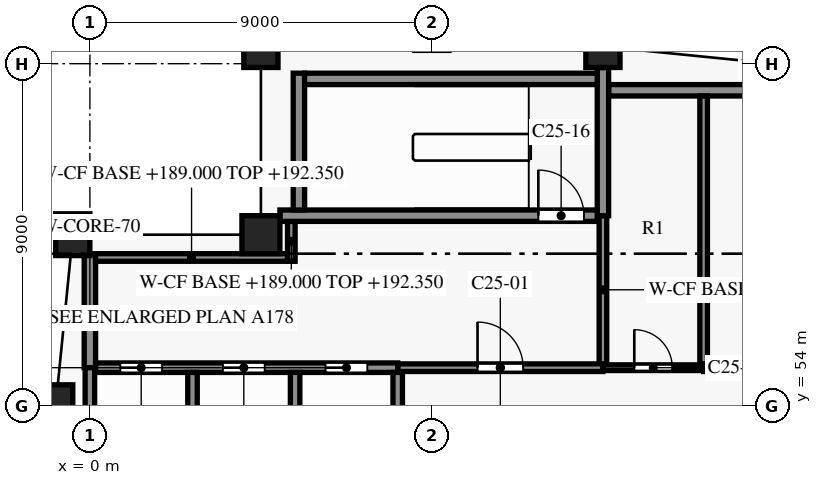
"""IFC4 building model, lengths in metres.
Left out: names, types, materials, properties, quantities, classifications, styles, units other than length and angle.
Written with IfcOpenShell. Run it as: python <this file> out.ifc"""

import sys

from ifc_helpers import new_model, si_unit, direction, frame, frame_2d, origin, origin_2d, place, context, subcontext, project, spatial, rectangle, extrude, element, fill, save


model = new_model("IFC4")
c1 = context("Model", 3, precision=1e-05, world=origin(), true_north=direction((0.0, 1.0)))
c2 = subcontext(c1, "Body", "Model", "MODEL_VIEW")
j1 = project(units=[si_unit("LENGTHUNIT", "METRE"), si_unit("PLANEANGLEUNIT", "RADIAN")], contexts=[c1])
p1 = place(None, origin())
s1 = spatial("IfcSite", under=j1, at=p1, CompositionType="ELEMENT")
p2 = place(p1, origin())
s2 = spatial("IfcBuilding", under=s1, at=p2, CompositionType="ELEMENT")
p3 = place(p2, frame((0.0, 0.0, 189.0)))
s3 = spatial("IfcBuildingStorey", under=s2, at=p3, CompositionType="ELEMENT", Elevation=189.0)
for number, where, z_axis, x_axis in (
    (1, (13.5, 63.45, 0.0), (0.0, 0.0, 1.0), (-0.995, 0.1, 0.0)),
    (2, (4.5, 63.45, 0.0), (0.0, 0.0, 1.0), (-0.995, -0.1, 0.0)),
    (3, (-0.45, 58.5, 0.0), (0.0, 0.0, 1.0), (-0.1, -0.995, 0.0)),
    (4, (-0.9, 54.0, 0.0), (0.0, 0.0, 1.0), (0.0, -1.0, 0.0)),
):
    element("IfcColumn", number, at=place(p3, frame(where, z_axis=z_axis, x_axis=x_axis)), inside=s3, PredefinedType="COLUMN", context=c2, shape_type="SweptSolid", body=[
        extrude(rectangle(XDim=0.9, YDim=1.1, at=origin_2d()), origin(), (0.0, 0.0, 1.0), 3.8),
    ])
p4 = place(p3, frame((4.5, 58.5, 0.0), z_axis=(0.0, 0.0, 1.0), x_axis=(1.0, 0.0, 0.0)))
e5 = element("IfcColumn", 5, at=p4, inside=s3, PredefinedType="COLUMN", context=c2, shape_type="SweptSolid", body=[
    extrude(rectangle(XDim=1.0, YDim=1.0, at=origin_2d()), origin(), (0.0, 0.0, 1.0), 3.8),
])
p5 = place(p3, frame((8.1, 55.0, 0.0), z_axis=(0.0, 0.0, 1.0), x_axis=(1.0, 0.0, 0.0)))
e6 = element("IfcWall", 6, at=p5, inside=s3, PredefinedType="PARTITIONING", context=c2, shape_type="SweptSolid", body=[
    extrude(rectangle(XDim=5.4, YDim=0.2, at=frame_2d((2.7, 0.0))), origin(), (0.0, 0.0, 1.0), 3.35),
])
p6 = place(p5, frame((2.1, 0.0, 0.0)))
e7 = element("IfcOpeningElement", 7, at=p6, cuts=e6, PredefinedType="OPENING", context=c2, shape_type="SweptSolid", body=[
    extrude(rectangle(XDim=1.2, YDim=2.2, at=frame_2d((0.6, 1.1))), frame((0.0, 0.11, 0.0), z_axis=(0.0, -1.0, 0.0), x_axis=(1.0, 0.0, 0.0)), (0.0, 0.0, 1.0), 0.22),
])
p7 = place(p3, frame((13.5, 55.0, 0.0), z_axis=(0.0, 0.0, 1.0), x_axis=(1.0, 0.0, 0.0)))
e8 = element("IfcWall", 8, at=p7, inside=s3, PredefinedType="PARTITIONING", context=c2, shape_type="SweptSolid", body=[
    extrude(rectangle(XDim=2.65, YDim=0.15, at=frame_2d((1.325, 0.0))), origin(), (0.0, 0.0, 1.0), 3.35),
])
p8 = place(p7, frame((0.825, 0.0, 0.0)))
e9 = element("IfcOpeningElement", 9, at=p8, cuts=e8, PredefinedType="OPENING", context=c2, shape_type="SweptSolid", body=[
    extrude(rectangle(XDim=1.0, YDim=2.1, at=frame_2d((0.5, 1.05))), frame((0.0, 0.085, 0.0), z_axis=(0.0, -1.0, 0.0), x_axis=(1.0, 0.0, 0.0)), (0.0, 0.0, 1.0), 0.17),
])
p9 = place(p3, frame((16.15, 55.0, 0.0), z_axis=(0.0, 0.0, 1.0), x_axis=(1.0, 0.0, 0.0)))
e10 = element("IfcWall", 10, at=p9, inside=s3, PredefinedType="PARTITIONING", context=c2, shape_type="SweptSolid", body=[
    extrude(rectangle(XDim=7.25, YDim=0.2, at=frame_2d((3.625, 0.0))), origin(), (0.0, 0.0, 1.0), 3.35),
])
p10 = place(p9, frame((3.125, 0.0, 0.0)))
e11 = element("IfcOpeningElement", 11, at=p10, cuts=e10, PredefinedType="OPENING", context=c2, shape_type="SweptSolid", body=[
    extrude(rectangle(XDim=1.0, YDim=2.1, at=frame_2d((0.5, 1.05))), frame((0.0, 0.11, 0.0), z_axis=(0.0, -1.0, 0.0), x_axis=(1.0, 0.0, 0.0)), (0.0, 0.0, 1.0), 0.22),
])
p11 = place(p3, frame((0.15, 55.0, 0.0), z_axis=(0.0, 0.0, 1.0), x_axis=(1.0, 0.0, 0.0)))
e12 = element("IfcWall", 12, at=p11, inside=s3, PredefinedType="SHEAR", context=c2, shape_type="SweptSolid", body=[
    extrude(rectangle(XDim=7.95, YDim=0.25, at=frame_2d((3.975, 0.0))), origin(), (0.0, 0.0, 1.0), 3.5),
])
p12 = place(p11, frame((0.65, 0.0, 0.0)))
e13 = element("IfcOpeningElement", 13, at=p12, cuts=e12, PredefinedType="OPENING", context=c2, shape_type="SweptSolid", body=[
    extrude(rectangle(XDim=1.1, YDim=2.1, at=frame_2d((0.55, 1.05))), frame((0.0, 0.135, 0.0), z_axis=(0.0, -1.0, 0.0), x_axis=(1.0, 0.0, 0.0)), (0.0, 0.0, 1.0), 0.27),
])
p13 = place(p11, frame((3.35, 0.0, 0.0)))
e14 = element("IfcOpeningElement", 14, at=p13, cuts=e12, PredefinedType="OPENING", context=c2, shape_type="SweptSolid", body=[
    extrude(rectangle(XDim=1.1, YDim=2.1, at=frame_2d((0.55, 1.05))), frame((0.0, 0.135, 0.0), z_axis=(0.0, -1.0, 0.0), x_axis=(1.0, 0.0, 0.0)), (0.0, 0.0, 1.0), 0.27),
])
p14 = place(p11, frame((6.05, 0.0, 0.0)))
e15 = element("IfcOpeningElement", 15, at=p14, cuts=e12, PredefinedType="OPENING", context=c2, shape_type="SweptSolid", body=[
    extrude(rectangle(XDim=1.1, YDim=2.1, at=frame_2d((0.55, 1.05))), frame((0.0, 0.135, 0.0), z_axis=(0.0, -1.0, 0.0), x_axis=(1.0, 0.0, 0.0)), (0.0, 0.0, 1.0), 0.27),
])
p15 = place(p3, frame((0.15, 57.9, 0.0), z_axis=(0.0, 0.0, 1.0), x_axis=(1.0, 0.0, 0.0)))
e16 = element("IfcWall", 16, at=p15, inside=s3, PredefinedType="PARTITIONING", context=c2, shape_type="SweptSolid", body=[
    extrude(rectangle(XDim=5.05, YDim=0.2, at=frame_2d((2.525, 0.0))), origin(), (0.0, 0.0, 1.0), 3.35),
])
p16 = place(p3, frame((5.0, 59.0, 0.0), z_axis=(0.0, 0.0, 1.0), x_axis=(1.0, 0.0, 0.0)))
e17 = element("IfcWall", 17, at=p16, inside=s3, PredefinedType="SHEAR", context=c2, shape_type="SweptSolid", body=[
    extrude(rectangle(XDim=8.35, YDim=0.3, at=frame_2d((4.175, 0.0))), origin(), (0.0, 0.0, 1.0), 3.5),
])
p17 = place(p16, frame((6.8, 0.0, 0.0)))
e18 = element("IfcOpeningElement", 18, at=p17, cuts=e17, PredefinedType="OPENING", context=c2, shape_type="SweptSolid", body=[
    extrude(rectangle(XDim=1.2, YDim=2.2, at=frame_2d((0.6, 1.1))), frame((0.0, 0.16, 0.0), z_axis=(0.0, -1.0, 0.0), x_axis=(1.0, 0.0, 0.0)), (0.0, 0.0, 1.0), 0.32),
])
p18 = place(p3, frame((13.65, 62.3, 0.0), z_axis=(0.0, 0.0, 1.0), x_axis=(1.0, 0.0, 0.0)))
e19 = element("IfcWall", 19, at=p18, inside=s3, PredefinedType="SHEAR", context=c2, shape_type="SweptSolid", body=[
    extrude(rectangle(XDim=9.6, YDim=0.3, at=frame_2d((4.8, 0.0))), origin(), (0.0, 0.0, 1.0), 3.5),
])
p19 = place(p3, frame((5.65, 62.6, 0.0), z_axis=(0.0, 0.0, 1.0), x_axis=(1.0, 0.0, 0.0)))
e20 = element("IfcWall", 20, at=p19, inside=s3, PredefinedType="SHEAR", context=c2, shape_type="SweptSolid", body=[
    extrude(rectangle(XDim=7.7, YDim=0.3, at=frame_2d((3.85, 0.0))), origin(), (0.0, 0.0, 1.0), 3.5),
])
p20 = place(p3, frame((0.0, 55.0, 0.0), z_axis=(0.0, 0.0, 1.0), x_axis=(0.0, 1.0, 0.0)))
e21 = element("IfcWall", 21, at=p20, inside=s3, PredefinedType="SHEAR", context=c2, shape_type="SweptSolid", body=[
    extrude(rectangle(XDim=3.0, YDim=0.3, at=frame_2d((1.5, 0.0))), origin(), (0.0, 0.0, 1.0), 3.5),
])
p21 = place(p3, frame((0.0, 51.65, 0.0), z_axis=(0.0, 0.0, 1.0), x_axis=(0.0, 1.0, 0.0)))
e22 = element("IfcWall", 22, at=p21, inside=s3, PredefinedType="SHEAR", context=c2, shape_type="SweptSolid", body=[
    extrude(rectangle(XDim=3.35, YDim=0.25, at=frame_2d((1.675, 0.0))), origin(), (0.0, 0.0, 1.0), 3.5),
])
p22 = place(p3, frame((2.7, 51.925, 0.0), z_axis=(0.0, 0.0, 1.0), x_axis=(0.0, 1.0, 0.0)))
e23 = element("IfcWall", 23, at=p22, inside=s3, PredefinedType="SHEAR", context=c2, shape_type="SweptSolid", body=[
    extrude(rectangle(XDim=2.95, YDim=0.25, at=frame_2d((1.475, 0.0))), origin(), (0.0, 0.0, 1.0), 3.5),
])
p23 = place(p3, frame((5.3, 57.8, 0.0), z_axis=(0.0, 0.0, 1.0), x_axis=(0.0, 1.0, 0.0)))
e24 = element("IfcWall", 24, at=p23, inside=s3, PredefinedType="PARTITIONING", context=c2, shape_type="SweptSolid", body=[
    extrude(rectangle(XDim=1.05, YDim=0.2, at=frame_2d((0.525, 0.0))), origin(), (0.0, 0.0, 1.0), 3.35),
])
p24 = place(p3, frame((5.4, 51.925, 0.0), z_axis=(0.0, 0.0, 1.0), x_axis=(0.0, 1.0, 0.0)))
e25 = element("IfcWall", 25, at=p24, inside=s3, PredefinedType="SHEAR", context=c2, shape_type="SweptSolid", body=[
    extrude(rectangle(XDim=2.95, YDim=0.25, at=frame_2d((1.475, 0.0))), origin(), (0.0, 0.0, 1.0), 3.5),
])
p25 = place(p3, frame((5.5, 59.15, 0.0), z_axis=(0.0, 0.0, 1.0), x_axis=(0.0, 1.0, 0.0)))
e26 = element("IfcWall", 26, at=p25, inside=s3, PredefinedType="SHEAR", context=c2, shape_type="SweptSolid", body=[
    extrude(rectangle(XDim=3.6, YDim=0.3, at=frame_2d((1.8, 0.0))), origin(), (0.0, 0.0, 1.0), 3.5),
])
p26 = place(p3, frame((8.1, 51.925, 0.0), z_axis=(0.0, 0.0, 1.0), x_axis=(0.0, 1.0, 0.0)))
e27 = element("IfcWall", 27, at=p26, inside=s3, PredefinedType="SHEAR", context=c2, shape_type="SweptSolid", body=[
    extrude(rectangle(XDim=2.95, YDim=0.25, at=frame_2d((1.475, 0.0))), origin(), (0.0, 0.0, 1.0), 3.5),
])
p27 = place(p3, frame((13.5, 55.1, 0.0), z_axis=(0.0, 0.0, 1.0), x_axis=(0.0, 1.0, 0.0)))
e28 = element("IfcWall", 28, at=p27, inside=s3, PredefinedType="PARTITIONING", context=c2, shape_type="SweptSolid", body=[
    extrude(rectangle(XDim=3.9, YDim=0.2, at=frame_2d((1.95, 0.0))), origin(), (0.0, 0.0, 1.0), 3.35),
])
p28 = place(p3, frame((13.5, 59.0, 0.0), z_axis=(0.0, 0.0, 1.0), x_axis=(0.0, 1.0, 0.0)))
e29 = element("IfcWall", 29, at=p28, inside=s3, PredefinedType="SHEAR", context=c2, shape_type="SweptSolid", body=[
    extrude(rectangle(XDim=3.897, YDim=0.3, at=frame_2d((1.949, 0.0))), origin(), (0.0, 0.0, 1.0), 3.5),
])
p29 = place(p3, frame((16.15, 55.1, 0.0), z_axis=(0.0, 0.0, 1.0), x_axis=(0.0, 1.0, 0.0)))
e30 = element("IfcWall", 30, at=p29, inside=s3, PredefinedType="PARTITIONING", context=c2, shape_type="SweptSolid", body=[
    extrude(rectangle(XDim=7.05, YDim=0.2, at=frame_2d((3.525, 0.0))), origin(), (0.0, 0.0, 1.0), 3.35),
])
p30 = place(p6, origin())
e31 = element("IfcDoor", 31, at=p30, inside=s3, OperationType="SINGLE_SWING_RIGHT", PredefinedType="DOOR", context=c2, shape_type="SweptSolid", body=[
    extrude(rectangle(XDim=1.2, YDim=2.2, at=frame_2d((0.6, 1.1))), frame((0.0, 0.025, 0.0), z_axis=(0.0, -1.0, 0.0), x_axis=(1.0, 0.0, 0.0)), (0.0, 0.0, 1.0), 0.05),
])
fill(e7, e31)
p31 = place(p8, origin())
e32 = element("IfcDoor", 32, at=p31, inside=s3, OperationType="SINGLE_SWING_LEFT", PredefinedType="DOOR", context=c2, shape_type="SweptSolid", body=[
    extrude(rectangle(XDim=1.0, YDim=2.1, at=frame_2d((0.5, 1.05))), frame((0.0, 0.025, 0.0), z_axis=(0.0, -1.0, 0.0), x_axis=(1.0, 0.0, 0.0)), (0.0, 0.0, 1.0), 0.05),
])
fill(e9, e32)
p32 = place(p17, origin())
e33 = element("IfcDoor", 33, at=p32, inside=s3, OperationType="SINGLE_SWING_RIGHT", PredefinedType="DOOR", context=c2, shape_type="SweptSolid", body=[
    extrude(rectangle(XDim=1.2, YDim=2.2, at=frame_2d((0.6, 1.1))), frame((0.0, 0.025, 0.0), z_axis=(0.0, -1.0, 0.0), x_axis=(1.0, 0.0, 0.0)), (0.0, 0.0, 1.0), 0.05),
])
fill(e18, e33)
p33 = place(p12, origin())
e34 = element("IfcDoor", 34, at=p33, inside=s3, OperationType="DOUBLE_DOOR_SLIDING", PredefinedType="DOOR", context=c2, shape_type="SweptSolid", body=[
    extrude(rectangle(XDim=1.1, YDim=2.1, at=frame_2d((0.55, 1.05))), frame((0.0, 0.025, 0.0), z_axis=(0.0, -1.0, 0.0), x_axis=(1.0, 0.0, 0.0)), (0.0, 0.0, 1.0), 0.05),
])
fill(e13, e34)
p34 = place(p13, origin())
e35 = element("IfcDoor", 35, at=p34, inside=s3, OperationType="DOUBLE_DOOR_SLIDING", PredefinedType="DOOR", context=c2, shape_type="SweptSolid", body=[
    extrude(rectangle(XDim=1.1, YDim=2.1, at=frame_2d((0.55, 1.05))), frame((0.0, 0.025, 0.0), z_axis=(0.0, -1.0, 0.0), x_axis=(1.0, 0.0, 0.0)), (0.0, 0.0, 1.0), 0.05),
])
fill(e14, e35)
p35 = place(p14, origin())
e36 = element("IfcDoor", 36, at=p35, inside=s3, OperationType="DOUBLE_DOOR_SLIDING", PredefinedType="DOOR", context=c2, shape_type="SweptSolid", body=[
    extrude(rectangle(XDim=1.1, YDim=2.1, at=frame_2d((0.55, 1.05))), frame((0.0, 0.025, 0.0), z_axis=(0.0, -1.0, 0.0), x_axis=(1.0, 0.0, 0.0)), (0.0, 0.0, 1.0), 0.05),
])
fill(e15, e36)
save(model, sys.argv[1])
